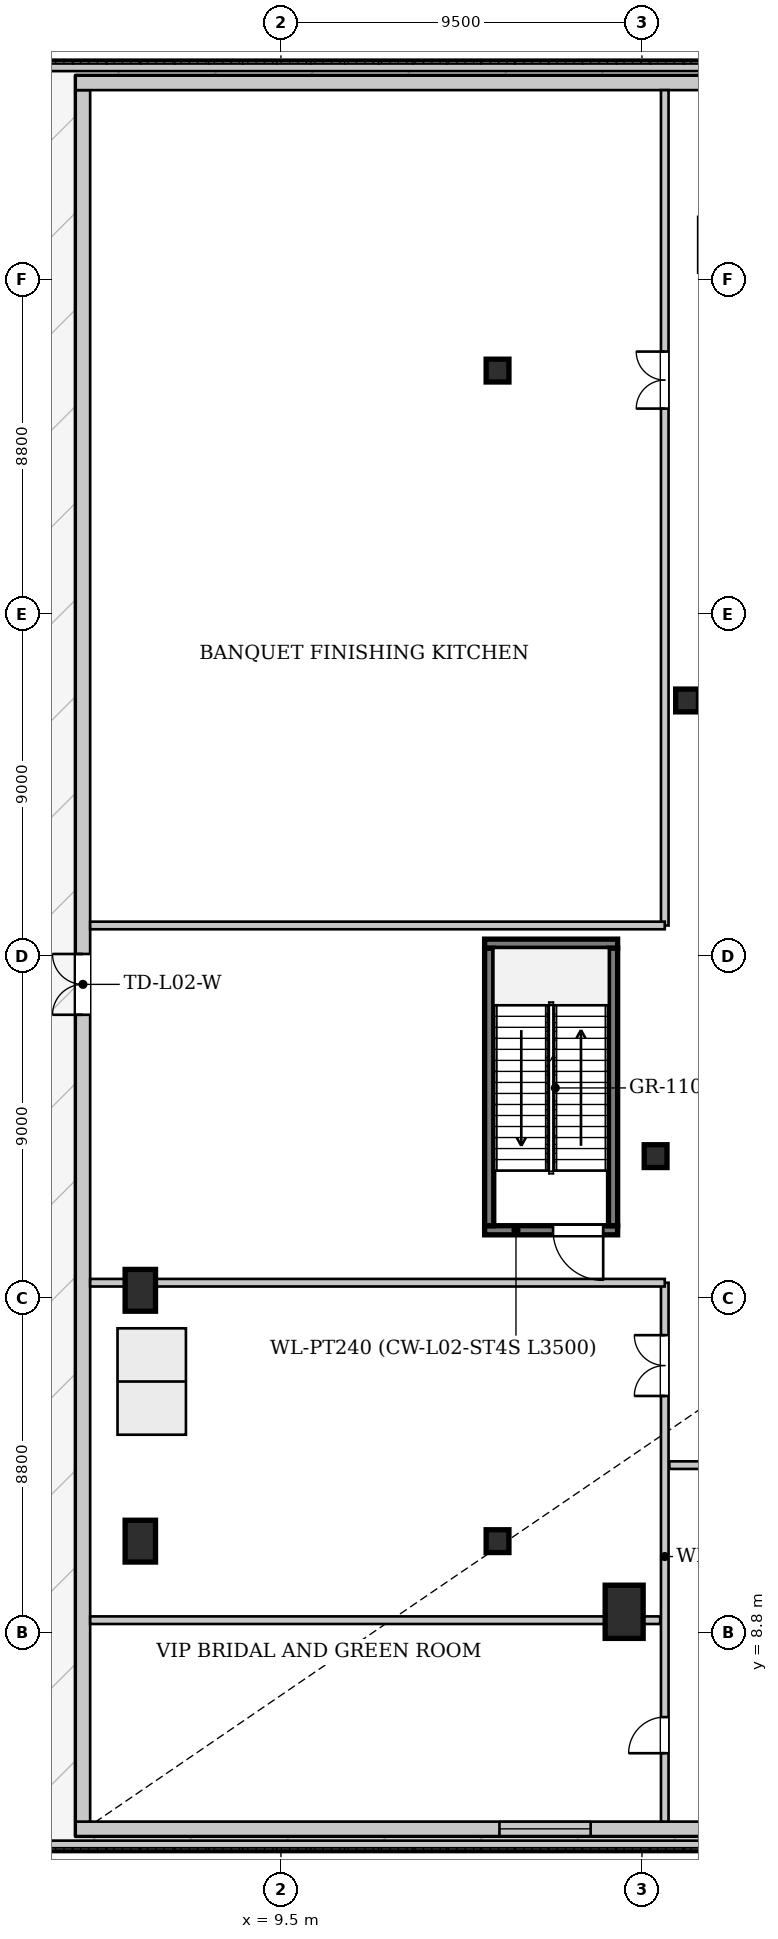
"""IFC4 building model, lengths in metres.
Left out: names, types, materials, properties, quantities, classifications, styles, units other than length and angle.
Written with IfcOpenShell. Run it as: python <this file> out.ifc"""

import sys

from ifc_helpers import new_model, si_unit, direction, frame, frame_2d, origin, origin_2d, place, context, subcontext, project, spatial, rectangle, hollow_rectangle, extrude, source, transform, mapped, element, fill, save


model = new_model("IFC4")
c1 = context("Model", 3, precision=1e-05, world=origin(), true_north=direction((0.0, 1.0)))
c2 = subcontext(c1, "Body", "Model", "MODEL_VIEW")
j1 = project(units=[si_unit("LENGTHUNIT", "METRE"), si_unit("PLANEANGLEUNIT", "RADIAN")], contexts=[c1])
p1 = place(None, origin())
s1 = spatial("IfcSite", under=j1, at=p1, CompositionType="ELEMENT")
p2 = place(p1, origin())
s2 = spatial("IfcBuilding", under=s1, at=p2, CompositionType="ELEMENT")
p3 = place(p2, frame((0.0, 0.0, 10.2)))
s3 = spatial("IfcBuildingStorey", under=s2, at=p3, CompositionType="ELEMENT", Elevation=10.2)
m1 = source(origin(), c2, "Body", "SweptSolid", [
    extrude(rectangle(XDim=1.0, YDim=1.4, at=origin_2d()), origin(), (0.0, 0.0, 1.0), 5.235),
])
p4 = place(p3, frame((18.532, 9.341, 0.0), z_axis=(0.0, 0.0, 1.0), x_axis=(1.0, 0.0, 0.0)))
e1 = element("IfcColumn", 1, at=p4, inside=s3, PredefinedType="COLUMN", context=c2, shape_type="MappedRepresentation", body=[
    mapped(m1, transform((0.0, 0.0, 0.0), x_axis=(1.0, 0.0, 0.0), y_axis=(0.0, 1.0, 0.0), z_axis=(0.0, 0.0, 1.0), scale=1.0)),
])
m2 = source(origin(), c2, "Body", "SweptSolid", [
    extrude(hollow_rectangle(XDim=0.6, YDim=0.6, WallThickness=0.035, at=origin_2d()), origin(), (0.0, 0.0, 1.0), 5.235),
])
for number, where, z_axis, x_axis in (
    (2, (15.2, 11.2, 0.0), (0.0, 0.0, 1.0), (1.0, 0.0, 0.0)),
    (3, (15.2, 42.0, 0.0), (0.0, 0.0, 1.0), (1.0, 0.0, 0.0)),
    (4, (20.187, 33.32, 0.0), (0.0, 0.0, 1.0), (1.0, 0.0, 0.0)),
    (5, (19.359, 21.331, 0.0), (0.0, 0.0, 1.0), (1.0, 0.0, 0.0)),
):
    element("IfcColumn", number, at=place(p3, frame(where, z_axis=z_axis, x_axis=x_axis)), inside=s3, PredefinedType="COLUMN", context=c2, shape_type="MappedRepresentation", body=[
        mapped(m2, transform((0.0, 0.0, 0.0), x_axis=(1.0, 0.0, 0.0), y_axis=(0.0, 1.0, 0.0), z_axis=(0.0, 0.0, 1.0), scale=1.0)),
    ])
m3 = source(origin(), c2, "Body", "SweptSolid", [
    extrude(rectangle(XDim=0.8, YDim=1.1, at=origin_2d()), origin(), (0.0, 0.0, 1.0), 5.235),
])
for number, where, z_axis, x_axis in (
    (6, (5.8, 11.2, 0.0), (0.0, 0.0, 1.0), (1.0, 0.0, 0.0)),
    (7, (5.8, 17.8, 0.0), (0.0, 0.0, 1.0), (1.0, 0.0, 0.0)),
):
    element("IfcColumn", number, at=place(p3, frame(where, z_axis=z_axis, x_axis=x_axis)), inside=s3, PredefinedType="COLUMN", context=c2, shape_type="MappedRepresentation", body=[
        mapped(m3, transform((0.0, 0.0, 0.0), x_axis=(1.0, 0.0, 0.0), y_axis=(0.0, 1.0, 0.0), z_axis=(0.0, 0.0, 1.0), scale=1.0)),
    ])
p5 = place(p3, frame((34.8, 3.63, 0.0), z_axis=(0.0, 0.0, 1.0), x_axis=(-1.0, 0.0, 0.0)))
e8 = element("IfcWall", 8, at=p5, inside=s3, PredefinedType="SOLIDWALL", context=c2, shape_type="SweptSolid", body=[
    extrude(rectangle(XDim=30.7, YDim=0.38, at=frame_2d((15.35, 0.0))), origin(), (0.0, 0.0, 1.0), 4.472),
])
p6 = place(p5, frame((17.15, 0.0, 0.85)))
e9 = element("IfcOpeningElement", 9, at=p6, cuts=e8, PredefinedType="OPENING", context=c2, shape_type="SweptSolid", body=[
    extrude(rectangle(XDim=2.4, YDim=3.0, at=frame_2d((1.2, 1.5))), frame((0.0, 0.2, 0.0), z_axis=(0.0, -1.0, 0.0), x_axis=(1.0, 0.0, 0.0)), (0.0, 0.0, 1.0), 0.4),
])
p7 = place(p3, frame((4.29, 3.82, 0.0), z_axis=(0.0, 0.0, 1.0), x_axis=(0.0, 1.0, 0.0)))
e10 = element("IfcWall", 10, at=p7, inside=s3, PredefinedType="SOLIDWALL", context=c2, shape_type="SweptSolid", body=[
    extrude(rectangle(XDim=45.56, YDim=0.38, at=frame_2d((22.78, 0.0))), origin(), (0.0, 0.0, 1.0), 4.472),
])
p8 = place(p7, frame((21.23, 0.0, 0.0)))
e11 = element("IfcOpeningElement", 11, at=p8, cuts=e10, PredefinedType="OPENING", context=c2, shape_type="SweptSolid", body=[
    extrude(rectangle(XDim=1.6, YDim=2.3, at=frame_2d((0.8, 1.15))), frame((0.0, 0.2, 0.0), z_axis=(0.0, -1.0, 0.0), x_axis=(1.0, 0.0, 0.0)), (0.0, 0.0, 1.0), 0.4),
])
p9 = place(p3, frame((4.1, 49.57, 0.0), z_axis=(0.0, 0.0, 1.0), x_axis=(1.0, 0.0, 0.0)))
e12 = element("IfcWall", 12, at=p9, inside=s3, PredefinedType="SOLIDWALL", context=c2, shape_type="SweptSolid", body=[
    extrude(rectangle(XDim=30.7, YDim=0.38, at=frame_2d((15.35, 0.0))), origin(), (0.0, 0.0, 1.0), 4.472),
])
p10 = place(p9, frame((17.15, 0.0, 0.85)))
e13 = element("IfcOpeningElement", 13, at=p10, cuts=e12, PredefinedType="OPENING", context=c2, shape_type="SweptSolid", body=[
    extrude(rectangle(XDim=2.4, YDim=3.0, at=frame_2d((1.2, 1.5))), frame((0.0, 0.2, 0.0), z_axis=(0.0, -1.0, 0.0), x_axis=(1.0, 0.0, 0.0)), (0.0, 0.0, 1.0), 0.4),
])
for number, where, z_axis, x_axis in (
    (14, (3.25, 3.18, 0.0), (0.0, 0.0, 1.0), (1.0, 0.0, 0.0)),
    (15, (3.25, 50.02, 0.0), (0.0, 0.0, 1.0), (1.0, 0.0, 0.0)),
):
    element("IfcWall", number, at=place(p3, frame(where, z_axis=z_axis, x_axis=x_axis)), inside=s3, PredefinedType="PARAPET", context=c2, shape_type="SweptSolid", body=[
        extrude(rectangle(XDim=69.5, YDim=0.28, at=frame_2d((34.75, 0.0))), origin(), (0.0, 0.0, 1.0), 0.45),
    ])
p11 = place(p3, frame((18.36, 19.38, 0.0), z_axis=(0.0, 0.0, 1.0), x_axis=(-1.0, 0.0, 0.0)))
e16 = element("IfcWall", 16, at=p11, inside=s3, PredefinedType="PARTITIONING", context=c2, shape_type="SweptSolid", body=[
    extrude(rectangle(XDim=3.5, YDim=0.24, at=frame_2d((1.75, 0.0))), origin(), (0.0, 0.0, 1.0), 5.08),
])
p12 = place(p11, frame((0.38, 0.0, 0.0)))
e17 = element("IfcOpeningElement", 17, at=p12, cuts=e16, PredefinedType="OPENING", context=c2, shape_type="SweptSolid", body=[
    extrude(rectangle(XDim=1.32, YDim=2.2, at=frame_2d((0.66, 1.1))), frame((0.0, 0.13, 0.0), z_axis=(0.0, -1.0, 0.0), x_axis=(1.0, 0.0, 0.0)), (0.0, 0.0, 1.0), 0.26),
])
p13 = place(p3, frame((14.86, 26.92, 0.0), z_axis=(0.0, 0.0, 1.0), x_axis=(1.0, 0.0, 0.0)))
e18 = element("IfcWall", 18, at=p13, inside=s3, PredefinedType="PARTITIONING", context=c2, shape_type="SweptSolid", body=[
    extrude(rectangle(XDim=3.5, YDim=0.24, at=frame_2d((1.75, 0.0))), origin(), (0.0, 0.0, 1.0), 5.08),
])
for number, where, z_axis, x_axis in (
    (19, (14.98, 19.5, 0.0), (0.0, 0.0, 1.0), (0.0, 1.0, 0.0)),
    (20, (18.24, 26.8, 0.0), (0.0, 0.0, 1.0), (0.0, -1.0, 0.0)),
):
    element("IfcWall", number, at=place(p3, frame(where, z_axis=z_axis, x_axis=x_axis)), inside=s3, PredefinedType="PARTITIONING", context=c2, shape_type="SweptSolid", body=[
        extrude(rectangle(XDim=7.3, YDim=0.24, at=frame_2d((3.65, 0.0))), origin(), (0.0, 0.0, 1.0), 5.08),
    ])
p14 = place(p3, frame((19.6, 3.82, 0.0), z_axis=(0.0, 0.0, 1.0), x_axis=(0.0, 1.0, 0.0)))
e21 = element("IfcWall", 21, at=p14, inside=s3, PredefinedType="PARTITIONING", context=c2, shape_type="SweptSolid", body=[
    extrude(rectangle(XDim=14.18, YDim=0.2, at=frame_2d((7.09, 0.0))), origin(), (0.0, 0.0, 1.0), 4.43),
])
p15 = place(p14, frame((1.8, 0.0, 0.0)))
e22 = element("IfcOpeningElement", 22, at=p15, cuts=e21, PredefinedType="OPENING", context=c2, shape_type="SweptSolid", body=[
    extrude(rectangle(XDim=0.95, YDim=2.1, at=frame_2d((0.475, 1.05))), frame((0.0, 0.11, 0.0), z_axis=(0.0, -1.0, 0.0), x_axis=(1.0, 0.0, 0.0)), (0.0, 0.0, 1.0), 0.22),
])
p16 = place(p14, frame((11.2, 0.0, 0.0)))
e23 = element("IfcOpeningElement", 23, at=p16, cuts=e21, PredefinedType="OPENING", context=c2, shape_type="SweptSolid", body=[
    extrude(rectangle(XDim=1.6, YDim=2.2, at=frame_2d((0.8, 1.1))), frame((0.0, 0.11, 0.0), z_axis=(0.0, -1.0, 0.0), x_axis=(1.0, 0.0, 0.0)), (0.0, 0.0, 1.0), 0.22),
])
p17 = place(p3, frame((4.48, 9.12, 0.0), z_axis=(0.0, 0.0, 1.0), x_axis=(1.0, 0.0, 0.0)))
e24 = element("IfcWall", 24, at=p17, inside=s3, PredefinedType="PARTITIONING", context=c2, shape_type="SweptSolid", body=[
    extrude(rectangle(XDim=15.0, YDim=0.2, at=frame_2d((7.5, 0.0))), origin(), (0.0, 0.0, 1.0), 4.43),
])
p18 = place(p3, frame((4.48, 18.0, 0.0), z_axis=(0.0, 0.0, 1.0), x_axis=(1.0, 0.0, 0.0)))
e25 = element("IfcWall", 25, at=p18, inside=s3, PredefinedType="PARTITIONING", context=c2, shape_type="SweptSolid", body=[
    extrude(rectangle(XDim=15.12, YDim=0.2, at=frame_2d((7.56, 0.0))), origin(), (0.0, 0.0, 1.0), 4.43),
])
p19 = place(p3, frame((19.6, 27.4, 0.0), z_axis=(0.0, 0.0, 1.0), x_axis=(0.0, 1.0, 0.0)))
e26 = element("IfcWall", 26, at=p19, inside=s3, PredefinedType="PARTITIONING", context=c2, shape_type="SweptSolid", body=[
    extrude(rectangle(XDim=21.98, YDim=0.2, at=frame_2d((10.99, 0.0))), origin(), (0.0, 0.0, 1.0), 4.43),
])
p20 = place(p19, frame((13.6, 0.0, 0.0)))
e27 = element("IfcOpeningElement", 27, at=p20, cuts=e26, PredefinedType="OPENING", context=c2, shape_type="SweptSolid", body=[
    extrude(rectangle(XDim=1.5, YDim=2.25, at=frame_2d((0.75, 1.125))), frame((0.0, 0.11, 0.0), z_axis=(0.0, -1.0, 0.0), x_axis=(1.0, 0.0, 0.0)), (0.0, 0.0, 1.0), 0.22),
])
p21 = place(p3, frame((4.48, 27.4, 0.0), z_axis=(0.0, 0.0, 1.0), x_axis=(1.0, 0.0, 0.0)))
e28 = element("IfcWall", 28, at=p21, inside=s3, PredefinedType="PARTITIONING", context=c2, shape_type="SweptSolid", body=[
    extrude(rectangle(XDim=15.12, YDim=0.2, at=frame_2d((7.56, 0.0))), origin(), (0.0, 0.0, 1.0), 4.43),
])
p22 = place(p3, frame((19.72, 13.2, 0.0), z_axis=(0.0, 0.0, 1.0), x_axis=(1.0, 0.0, 0.0)))
e29 = element("IfcWall", 29, at=p22, inside=s3, PredefinedType="PARTITIONING", context=c2, shape_type="SweptSolid", body=[
    extrude(rectangle(XDim=34.76, YDim=0.2, at=frame_2d((17.38, 0.0))), origin(), (0.0, 0.0, 1.0), 4.43),
])
p23 = place(p22, frame((13.5, 0.0, 0.0)))
e30 = element("IfcOpeningElement", 30, at=p23, cuts=e29, PredefinedType="OPENING", context=c2, shape_type="SweptSolid", body=[
    extrude(rectangle(XDim=1.6, YDim=2.2, at=frame_2d((0.8, 1.1))), frame((0.0, 0.11, 0.0), z_axis=(0.0, -1.0, 0.0), x_axis=(1.0, 0.0, 0.0)), (0.0, 0.0, 1.0), 0.22),
])
m4 = source(origin(), c2, "Body", "SweptSolid", [
    extrude(rectangle(XDim=1.6, YDim=2.3, at=frame_2d((0.8, 1.15))), frame((0.0, 0.025, 0.0), z_axis=(0.0, -1.0, 0.0), x_axis=(1.0, 0.0, 0.0)), (0.0, 0.0, 1.0), 0.05),
])
p24 = place(p8, origin())
e31 = element("IfcDoor", 31, at=p24, inside=s3, OperationType="DOUBLE_DOOR_SINGLE_SWING", PredefinedType="DOOR", context=c2, shape_type="MappedRepresentation", body=[
    mapped(m4, transform((0.0, 0.0, 0.0), x_axis=(1.0, 0.0, 0.0), y_axis=(0.0, 1.0, 0.0), z_axis=(0.0, 0.0, 1.0), scale=1.0)),
])
fill(e11, e31)
m5 = source(origin(), c2, "Body", "SweptSolid", [
    extrude(rectangle(XDim=2.4, YDim=3.0, at=frame_2d((1.2, 1.5))), frame((0.0, 0.03, 0.0), z_axis=(0.0, -1.0, 0.0), x_axis=(1.0, 0.0, 0.0)), (0.0, 0.0, 1.0), 0.06),
])
p25 = place(p6, origin())
e32 = element("IfcWindow", 32, at=p25, inside=s3, PartitioningType="SINGLE_PANEL", PredefinedType="WINDOW", context=c2, shape_type="MappedRepresentation", body=[
    mapped(m5, transform((0.0, 0.0, 0.0), x_axis=(1.0, 0.0, 0.0), y_axis=(0.0, 1.0, 0.0), z_axis=(0.0, 0.0, 1.0), scale=1.0)),
])
fill(e9, e32)
m6 = source(origin(), c2, "Body", "SweptSolid", [
    extrude(rectangle(XDim=1.32, YDim=2.2, at=frame_2d((0.66, 1.1))), frame((0.0, 0.025, 0.0), z_axis=(0.0, -1.0, 0.0), x_axis=(1.0, 0.0, 0.0)), (0.0, 0.0, 1.0), 0.05),
])
p26 = place(p12, origin())
e33 = element("IfcDoor", 33, at=p26, inside=s3, OperationType="SINGLE_SWING_LEFT", PredefinedType="DOOR", context=c2, shape_type="MappedRepresentation", body=[
    mapped(m6, transform((0.0, 0.0, 0.0), x_axis=(1.0, 0.0, 0.0), y_axis=(0.0, 1.0, 0.0), z_axis=(0.0, 0.0, 1.0), scale=1.0)),
])
fill(e17, e33)
m7 = source(origin(), c2, "Body", "SweptSolid", [
    extrude(rectangle(XDim=0.95, YDim=2.1, at=frame_2d((0.475, 1.05))), frame((0.0, 0.025, 0.0), z_axis=(0.0, -1.0, 0.0), x_axis=(1.0, 0.0, 0.0)), (0.0, 0.0, 1.0), 0.05),
])
p27 = place(p15, origin())
e34 = element("IfcDoor", 34, at=p27, inside=s3, OperationType="SINGLE_SWING_LEFT", PredefinedType="DOOR", context=c2, shape_type="MappedRepresentation", body=[
    mapped(m7, transform((0.0, 0.0, 0.0), x_axis=(1.0, 0.0, 0.0), y_axis=(0.0, 1.0, 0.0), z_axis=(0.0, 0.0, 1.0), scale=1.0)),
])
fill(e22, e34)
m8 = source(origin(), c2, "Body", "SweptSolid", [
    extrude(rectangle(XDim=1.6, YDim=2.2, at=frame_2d((0.8, 1.1))), frame((0.0, 0.025, 0.0), z_axis=(0.0, -1.0, 0.0), x_axis=(1.0, 0.0, 0.0)), (0.0, 0.0, 1.0), 0.05),
])
p28 = place(p16, origin())
e35 = element("IfcDoor", 35, at=p28, inside=s3, OperationType="DOUBLE_DOOR_SINGLE_SWING", PredefinedType="DOOR", context=c2, shape_type="MappedRepresentation", body=[
    mapped(m8, transform((0.0, 0.0, 0.0), x_axis=(1.0, 0.0, 0.0), y_axis=(0.0, 1.0, 0.0), z_axis=(0.0, 0.0, 1.0), scale=1.0)),
])
fill(e23, e35)
m9 = source(origin(), c2, "Body", "SweptSolid", [
    extrude(rectangle(XDim=1.5, YDim=2.25, at=frame_2d((0.75, 1.125))), frame((0.0, 0.025, 0.0), z_axis=(0.0, -1.0, 0.0), x_axis=(1.0, 0.0, 0.0)), (0.0, 0.0, 1.0), 0.05),
])
p29 = place(p20, origin())
e36 = element("IfcDoor", 36, at=p29, inside=s3, OperationType="DOUBLE_DOOR_SINGLE_SWING", PredefinedType="DOOR", context=c2, shape_type="MappedRepresentation", body=[
    mapped(m9, transform((0.0, 0.0, 0.0), x_axis=(1.0, 0.0, 0.0), y_axis=(0.0, 1.0, 0.0), z_axis=(0.0, 0.0, 1.0), scale=1.0)),
])
fill(e27, e36)
save(model, sys.argv[1])
